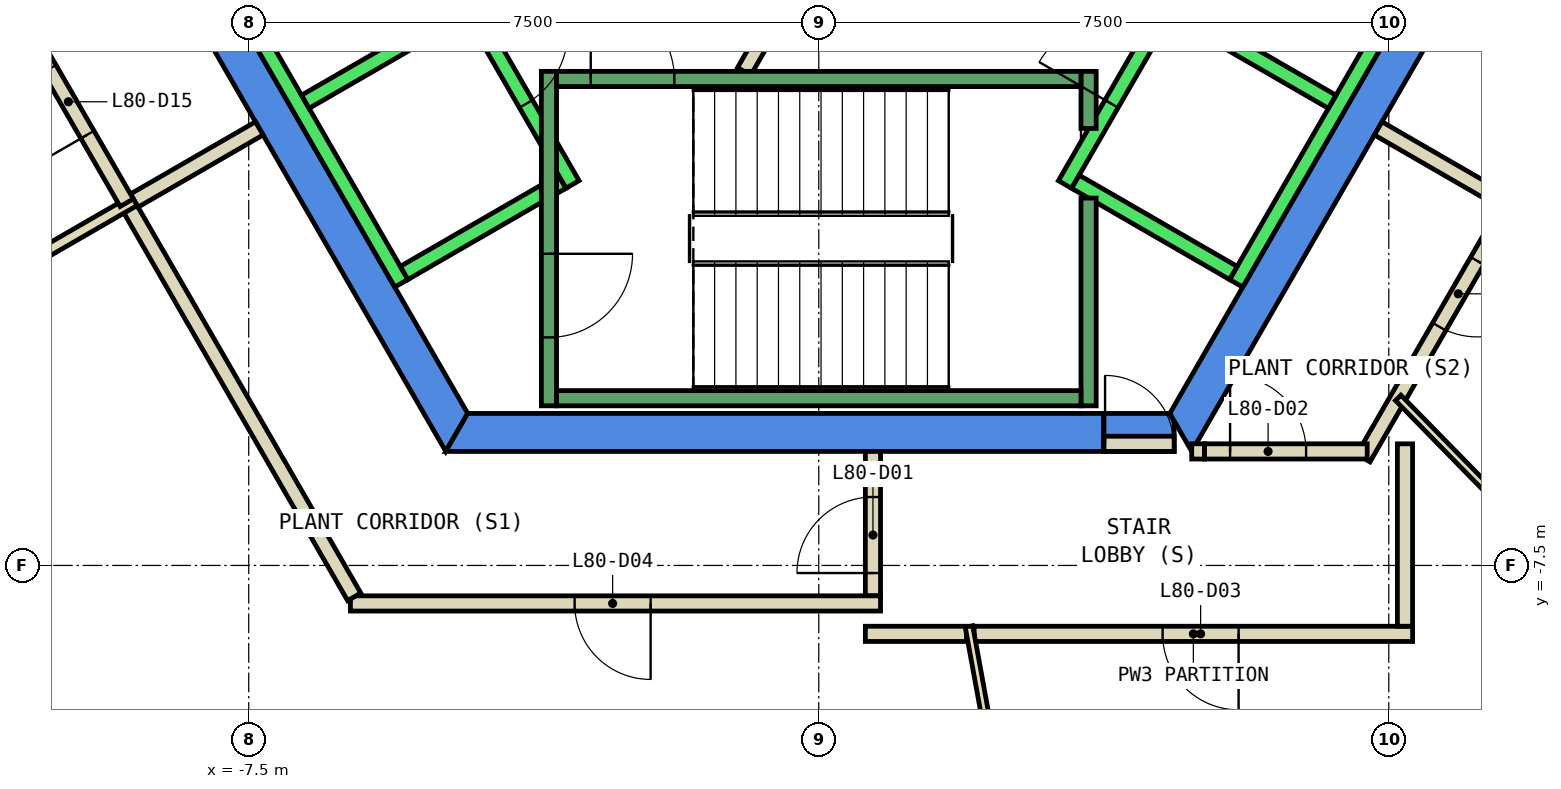
"""IFC4 building model, lengths in metres.
Left out: names, types, materials, properties, quantities, classifications, styles, units other than length and angle.
Written with IfcOpenShell. Run it as: python <this file> out.ifc"""

import sys

from ifc_helpers import new_model, si_unit, direction, frame, frame_2d, origin, place, context, subcontext, project, spatial, polyline, rectangle, outline, extrude, element, fill, save


model = new_model("IFC4")
c1 = context("Model", 3, precision=1e-05, world=origin(), true_north=direction((0.0, 1.0)))
c2 = subcontext(c1, "Body", "Model", "MODEL_VIEW")
j1 = project(units=[si_unit("LENGTHUNIT", "METRE"), si_unit("PLANEANGLEUNIT", "RADIAN")], contexts=[c1])
p1 = place(None, origin())
s1 = spatial("IfcSite", under=j1, at=p1, CompositionType="ELEMENT")
p2 = place(p1, origin())
s2 = spatial("IfcBuilding", under=s1, at=p2, CompositionType="ELEMENT")
p3 = place(p2, frame((0.0, 0.0, 340.4)))
s3 = spatial("IfcBuildingStorey", under=s2, at=p3, CompositionType="ELEMENT", Elevation=340.4)
p4 = place(p3, frame((0.0, 0.0, -0.45)))
e1 = element("IfcWall", 1, at=p4, inside=s3, PredefinedType="SHEAR", context=c2, shape_type="SweptSolid", body=[
    extrude(outline(polyline([(-9.815, 2.5), (-4.907, -6.0), (-4.619, -5.5), (-9.238, 2.5), (-9.815, 2.5)])), origin(), (0.0, 0.0, 1.0), 4.6),
])
p5 = place(p3, frame((0.0, 0.0, -0.45)))
e2 = element("IfcWall", 2, at=p5, inside=s3, PredefinedType="SHEAR", context=c2, shape_type="SweptSolid", body=[
    extrude(outline(polyline([(3.75, -6.0), (3.75, -5.5), (-4.619, -5.5), (-4.907, -6.0), (3.75, -6.0)])), origin(), (0.0, 0.0, 1.0), 4.6),
])
p6 = place(p3, frame((0.0, 0.0, 3.6)))
e3 = element("IfcWall", 3, at=p6, inside=s3, PredefinedType="SHEAR", context=c2, shape_type="SweptSolid", body=[
    extrude(outline(polyline([(4.676, -6.0), (4.676, -5.6), (4.619, -5.5), (3.75, -5.5), (3.75, -6.0), (4.676, -6.0)])), origin(), (0.0, 0.0, 1.0), 0.55),
])
p7 = place(p3, frame((0.0, 0.0, -0.45)))
e4 = element("IfcWall", 4, at=p7, inside=s3, PredefinedType="SHEAR", context=c2, shape_type="SweptSolid", body=[
    extrude(outline(polyline([(4.907, -6.0), (9.815, 2.5), (9.238, 2.5), (4.619, -5.5), (4.907, -6.0)])), origin(), (0.0, 0.0, 1.0), 4.6),
])
p8 = place(p3, frame((-0.982, -1.0, 0.0), z_axis=(0.0, 0.0, 1.0), x_axis=(0.50024047865, 0.865886518847, 0.0)))
e5 = element("IfcWall", 5, at=p8, inside=s3, PredefinedType="PARTITIONING", context=c2, shape_type="SweptSolid", body=[
    extrude(rectangle(XDim=1.863, YDim=0.2, at=frame_2d((0.931, 0.0))), origin(), (0.0, 0.0, 1.0), 4.15),
])
p9 = place(p3, frame((0.713, -7.9, 0.0), z_axis=(0.0, 0.0, 1.0), x_axis=(0.0, 1.0, 0.0)))
e6 = element("IfcWall", 6, at=p9, inside=s3, PredefinedType="PARTITIONING", context=c2, shape_type="SweptSolid", body=[
    extrude(rectangle(XDim=1.9, YDim=0.2, at=frame_2d((0.95, 0.0))), origin(), (0.0, 0.0, 1.0), 4.15),
])
p10 = place(p9, frame((0.3, 0.0, 0.0)))
e7 = element("IfcOpeningElement", 7, at=p10, cuts=e6, PredefinedType="OPENING", context=c2, shape_type="SweptSolid", body=[
    extrude(rectangle(XDim=1.0, YDim=2.1, at=frame_2d((0.5, 1.05))), frame((0.0, 0.11, 0.0), z_axis=(0.0, -1.0, 0.0), x_axis=(1.0, 0.0, 0.0)), (0.0, 0.0, 1.0), 0.22),
])
p11 = place(p3, frame((4.907, -6.0, 0.0), z_axis=(0.0, 0.0, 1.0), x_axis=(1.0, 0.0, 0.0)))
e8 = element("IfcWall", 8, at=p11, inside=s3, PredefinedType="PARTITIONING", context=c2, shape_type="SweptSolid", body=[
    extrude(rectangle(XDim=0.169, YDim=0.2, at=frame_2d((0.084, 0.0))), origin(), (0.0, 0.0, 1.0), 2.4),
])
p12 = place(p3, frame((7.813, -8.4, 0.0), z_axis=(0.0, 0.0, 1.0), x_axis=(-1.0, 0.0, 0.0)))
e9 = element("IfcWall", 9, at=p12, inside=s3, PredefinedType="PARTITIONING", context=c2, shape_type="SweptSolid", body=[
    extrude(rectangle(XDim=5.769, YDim=0.2, at=frame_2d((2.885, 0.0))), origin(), (0.0, 0.0, 1.0), 4.15),
])
p13 = place(p12, frame((2.289, 0.0, 0.0)))
e10 = element("IfcOpeningElement", 10, at=p13, cuts=e9, PredefinedType="OPENING", context=c2, shape_type="SweptSolid", body=[
    extrude(rectangle(XDim=1.0, YDim=2.1, at=frame_2d((0.5, 1.05))), frame((0.0, 0.11, 0.0), z_axis=(0.0, -1.0, 0.0), x_axis=(1.0, 0.0, 0.0)), (0.0, 0.0, 1.0), 0.22),
])
p14 = place(p3, frame((7.713, -5.9, 0.0), z_axis=(0.0, 0.0, 1.0), x_axis=(0.0, -1.0, 0.0)))
e11 = element("IfcWall", 11, at=p14, inside=s3, PredefinedType="PARTITIONING", context=c2, shape_type="SweptSolid", body=[
    extrude(rectangle(XDim=2.4, YDim=0.2, at=frame_2d((1.2, 0.0))), origin(), (0.0, 0.0, 1.0), 4.15),
])
p15 = place(p3, frame((1.944, -8.4, 0.0), z_axis=(0.0, 0.0, 1.0), x_axis=(-1.0, 0.0, 0.0)))
e12 = element("IfcWall", 12, at=p15, inside=s3, PredefinedType="PARTITIONING", context=c2, shape_type="SweptSolid", body=[
    extrude(rectangle(XDim=1.331, YDim=0.2, at=frame_2d((0.666, 0.0))), origin(), (0.0, 0.0, 1.0), 4.15),
])
p16 = place(p3, frame((0.813, -8.0, 0.0), z_axis=(0.0, 0.0, 1.0), x_axis=(-1.0, 0.0, 0.0)))
e13 = element("IfcWall", 13, at=p16, inside=s3, PredefinedType="PARTITIONING", context=c2, shape_type="SweptSolid", body=[
    extrude(rectangle(XDim=6.975, YDim=0.2, at=frame_2d((3.488, 0.0))), origin(), (0.0, 0.0, 1.0), 4.15),
])
p17 = place(p16, frame((3.025, 0.0, 0.0)))
e14 = element("IfcOpeningElement", 14, at=p17, cuts=e13, PredefinedType="OPENING", context=c2, shape_type="SweptSolid", body=[
    extrude(rectangle(XDim=1.0, YDim=2.1, at=frame_2d((0.5, 1.05))), frame((0.0, 0.11, 0.0), z_axis=(0.0, -1.0, 0.0), x_axis=(1.0, 0.0, 0.0)), (0.0, 0.0, 1.0), 0.22),
])
p18 = place(p3, frame((-6.112, -7.913, 0.0), z_axis=(0.0, 0.0, 1.0), x_axis=(-0.499915430684, 0.866074224396, 0.0)))
e15 = element("IfcWall", 15, at=p18, inside=s3, PredefinedType="PARTITIONING", context=c2, shape_type="SweptSolid", body=[
    extrude(rectangle(XDim=5.987, YDim=0.2, at=frame_2d((2.993, 0.0))), origin(), (0.0, 0.0, 1.0), 4.15),
])
p19 = place(p3, frame((-9.006, -2.7, 0.0), z_axis=(0.0, 0.0, 1.0), x_axis=(0.865980106173, 0.500078449558, 0.0)))
e16 = element("IfcWall", 16, at=p19, inside=s3, PredefinedType="PARTITIONING", context=c2, shape_type="SweptSolid", body=[
    extrude(rectangle(XDim=1.9, YDim=0.2, at=frame_2d((0.95, 0.0))), origin(), (0.0, 0.0, 1.0), 4.15),
])
p20 = place(p3, frame((9.106, -2.728, 0.0), z_axis=(0.0, 0.0, 1.0), x_axis=(-0.500132879116, -0.865948672398, 0.0)))
e17 = element("IfcWall", 17, at=p20, inside=s3, PredefinedType="PARTITIONING", context=c2, shape_type="SweptSolid", body=[
    extrude(rectangle(XDim=3.879, YDim=0.2, at=frame_2d((1.939, 0.0))), origin(), (0.0, 0.0, 1.0), 4.15),
])
p21 = place(p20, frame((0.884, 0.0, 0.0)))
e18 = element("IfcOpeningElement", 18, at=p21, cuts=e17, PredefinedType="OPENING", context=c2, shape_type="SweptSolid", body=[
    extrude(rectangle(XDim=1.0, YDim=2.1, at=frame_2d((0.5, 1.05))), frame((0.0, 0.11, 0.0), z_axis=(0.0, -1.0, 0.0), x_axis=(1.0, 0.0, 0.0)), (0.0, 0.0, 1.0), 0.22),
])
p22 = place(p3, frame((7.361, -1.75, 0.0), z_axis=(0.0, 0.0, 1.0), x_axis=(0.865980106173, -0.500078449558, 0.0)))
e19 = element("IfcWall", 19, at=p22, inside=s3, PredefinedType="PARTITIONING", context=c2, shape_type="SweptSolid", body=[
    extrude(rectangle(XDim=1.9, YDim=0.2, at=frame_2d((0.95, 0.0))), origin(), (0.0, 0.0, 1.0), 4.15),
])
p23 = place(p3, frame((3.139, -14.661, 0.0), z_axis=(0.0, 0.0, 1.0), x_axis=(-0.179885726398, 0.983687514121, 0.0)))
e20 = element("IfcWall", 20, at=p23, inside=s3, PredefinedType="PARTITIONING", context=c2, shape_type="SweptSolid", body=[
    extrude(rectangle(XDim=6.464, YDim=0.1, at=frame_2d((3.232, 0.0))), origin(), (0.0, 0.0, 1.0), 4.15),
])
p24 = place(p3, frame((7.624, -5.295, 0.0), z_axis=(0.0, 0.0, 1.0), x_axis=(0.699225895869, -0.714900794898, 0.0)))
e21 = element("IfcWall", 21, at=p24, inside=s3, PredefinedType="PARTITIONING", context=c2, shape_type="SweptSolid", body=[
    extrude(rectangle(XDim=11.681, YDim=0.1, at=frame_2d((5.841, 0.0))), origin(), (0.0, 0.0, 1.0), 4.15),
])
p25 = place(p3, frame((-19.664, -8.853, 0.0), z_axis=(0.0, 0.0, 1.0), x_axis=(0.866035935173, 0.499981758657, 0.0)))
e22 = element("IfcWall", 22, at=p25, inside=s3, PredefinedType="PARTITIONING", context=c2, shape_type="SweptSolid", body=[
    extrude(rectangle(XDim=12.307, YDim=0.15, at=frame_2d((6.153, 0.0))), origin(), (0.0, 0.0, 1.0), 4.15),
])
p26 = place(p3, frame((-9.105, -2.728, 0.0), z_axis=(0.0, 0.0, 1.0), x_axis=(-0.500253029287, 0.865879267963, 0.0)))
e23 = element("IfcWall", 23, at=p26, inside=s3, PredefinedType="PARTITIONING", context=c2, shape_type="SweptSolid", body=[
    extrude(rectangle(XDim=2.814, YDim=0.2, at=frame_2d((1.407, 0.0))), origin(), (0.0, 0.0, 1.0), 4.15),
])
p27 = place(p26, frame((1.034, 0.0, 0.0)))
e24 = element("IfcOpeningElement", 24, at=p27, cuts=e23, PredefinedType="OPENING", context=c2, shape_type="SweptSolid", body=[
    extrude(rectangle(XDim=1.0, YDim=2.1, at=frame_2d((0.5, 1.05))), frame((0.0, 0.11, 0.0), z_axis=(0.0, -1.0, 0.0), x_axis=(1.0, 0.0, 0.0)), (0.0, 0.0, 1.0), 0.22),
])
p28 = place(p3, frame((3.75, -5.9, 0.0), z_axis=(0.0, 0.0, 1.0), x_axis=(1.0, 0.0, 0.0)))
e25 = element("IfcWall", 25, at=p28, inside=s3, PredefinedType="PARTITIONING", context=c2, shape_type="SweptSolid", body=[
    extrude(rectangle(XDim=0.926, YDim=0.2, at=frame_2d((0.463, 0.0))), origin(), (0.0, 0.0, 1.0), 2.4),
])
p29 = place(p28, frame((0.017, 0.0, 0.0)))
e26 = element("IfcOpeningElement", 26, at=p29, cuts=e25, PredefinedType="OPENING", context=c2, shape_type="SweptSolid", body=[
    extrude(rectangle(XDim=0.9, YDim=2.1, at=frame_2d((0.45, 1.05))), frame((0.0, 0.11, 0.0), z_axis=(0.0, -1.0, 0.0), x_axis=(1.0, 0.0, 0.0)), (0.0, 0.0, 1.0), 0.22),
])
p30 = place(p3, frame((5.076, -6.0, 0.0), z_axis=(0.0, 0.0, 1.0), x_axis=(1.0, 0.0, 0.0)))
e27 = element("IfcWall", 27, at=p30, inside=s3, PredefinedType="PARTITIONING", context=c2, shape_type="SweptSolid", body=[
    extrude(rectangle(XDim=2.14, YDim=0.2, at=frame_2d((1.07, 0.0))), origin(), (0.0, 0.0, 1.0), 4.15),
])
p31 = place(p30, frame((0.336, 0.0, 0.0)))
e28 = element("IfcOpeningElement", 28, at=p31, cuts=e27, PredefinedType="OPENING", context=c2, shape_type="SweptSolid", body=[
    extrude(rectangle(XDim=1.0, YDim=2.1, at=frame_2d((0.5, 1.05))), frame((0.0, 0.11, 0.0), z_axis=(0.0, -1.0, 0.0), x_axis=(1.0, 0.0, 0.0)), (0.0, 0.0, 1.0), 0.22),
])
p32 = place(p3, frame((-5.94, 2.188, 0.0), z_axis=(0.0, 0.0, 1.0), x_axis=(0.500034260056, -0.866005622828, 0.0)))
e29 = element("IfcWall", 29, at=p32, inside=s3, PredefinedType="STANDARD", context=c2, shape_type="SweptSolid", body=[
    extrude(rectangle(XDim=5.399, YDim=0.2, at=frame_2d((2.7, 0.0))), origin(), (0.0, 0.0, 1.0), 4.15),
])
p33 = place(p32, frame((3.075, 0.0, 0.0)))
e30 = element("IfcOpeningElement", 30, at=p33, cuts=e29, PredefinedType="OPENING", context=c2, shape_type="SweptSolid", body=[
    extrude(rectangle(XDim=1.1, YDim=2.1, at=frame_2d((0.55, 1.05))), frame((0.0, 0.11, 0.0), z_axis=(0.0, -1.0, 0.0), x_axis=(1.0, 0.0, 0.0)), (0.0, 0.0, 1.0), 0.22),
])
p34 = place(p32, frame((1.225, 0.0, 0.0)))
e31 = element("IfcOpeningElement", 31, at=p34, cuts=e29, PredefinedType="OPENING", context=c2, shape_type="SweptSolid", body=[
    extrude(rectangle(XDim=1.1, YDim=2.1, at=frame_2d((0.55, 1.05))), frame((0.0, 0.11, 0.0), z_axis=(0.0, -1.0, 0.0), x_axis=(1.0, 0.0, 0.0)), (0.0, 0.0, 1.0), 0.22),
])
p35 = place(p3, frame((-8.192, 0.888, 0.0), z_axis=(0.0, 0.0, 1.0), x_axis=(0.500034260056, -0.866005622828, 0.0)))
e32 = element("IfcWall", 32, at=p35, inside=s3, PredefinedType="STANDARD", context=c2, shape_type="SweptSolid", body=[
    extrude(rectangle(XDim=5.399, YDim=0.2, at=frame_2d((2.7, 0.0))), origin(), (0.0, 0.0, 1.0), 4.15),
])
p36 = place(p3, frame((-4.677, -0.2, 0.0), z_axis=(0.0, 0.0, 1.0), x_axis=(-0.865973769406, -0.500089422704, 0.0)))
e33 = element("IfcWall", 33, at=p36, inside=s3, PredefinedType="STANDARD", context=c2, shape_type="SweptSolid", body=[
    extrude(rectangle(XDim=2.399, YDim=0.2, at=frame_2d((1.2, 0.0))), origin(), (0.0, 0.0, 1.0), 4.15),
])
p37 = place(p3, frame((-3.377, -2.452, 0.0), z_axis=(0.0, 0.0, 1.0), x_axis=(-0.865955154139, -0.50012165622, 0.0)))
e34 = element("IfcWall", 34, at=p37, inside=s3, PredefinedType="STANDARD", context=c2, shape_type="SweptSolid", body=[
    extrude(rectangle(XDim=2.4, YDim=0.2, at=frame_2d((1.2, 0.0))), origin(), (0.0, 0.0, 1.0), 4.15),
])
p38 = place(p3, frame((3.24, -2.488, 0.0), z_axis=(0.0, 0.0, 1.0), x_axis=(0.500034260056, 0.866005622828, 0.0)))
e35 = element("IfcWall", 35, at=p38, inside=s3, PredefinedType="STANDARD", context=c2, shape_type="SweptSolid", body=[
    extrude(rectangle(XDim=5.399, YDim=0.2, at=frame_2d((2.7, 0.0))), origin(), (0.0, 0.0, 1.0), 4.15),
])
p39 = place(p38, frame((3.225, 0.0, 0.0)))
e36 = element("IfcOpeningElement", 36, at=p39, cuts=e35, PredefinedType="OPENING", context=c2, shape_type="SweptSolid", body=[
    extrude(rectangle(XDim=1.1, YDim=2.1, at=frame_2d((0.55, 1.05))), frame((0.0, 0.11, 0.0), z_axis=(0.0, -1.0, 0.0), x_axis=(1.0, 0.0, 0.0)), (0.0, 0.0, 1.0), 0.22),
])
p40 = place(p38, frame((1.225, 0.0, 0.0)))
e37 = element("IfcOpeningElement", 37, at=p40, cuts=e35, PredefinedType="OPENING", context=c2, shape_type="SweptSolid", body=[
    extrude(rectangle(XDim=1.1, YDim=2.1, at=frame_2d((0.55, 1.05))), frame((0.0, 0.11, 0.0), z_axis=(0.0, -1.0, 0.0), x_axis=(1.0, 0.0, 0.0)), (0.0, 0.0, 1.0), 0.22),
])
p41 = place(p3, frame((5.492, -3.788, 0.0), z_axis=(0.0, 0.0, 1.0), x_axis=(0.500034260056, 0.866005622828, 0.0)))
e38 = element("IfcWall", 38, at=p41, inside=s3, PredefinedType="STANDARD", context=c2, shape_type="SweptSolid", body=[
    extrude(rectangle(XDim=5.399, YDim=0.2, at=frame_2d((2.7, 0.0))), origin(), (0.0, 0.0, 1.0), 4.15),
])
p42 = place(p3, frame((3.377, -2.452, 0.0), z_axis=(0.0, 0.0, 1.0), x_axis=(0.865955154139, -0.50012165622, 0.0)))
e39 = element("IfcWall", 39, at=p42, inside=s3, PredefinedType="STANDARD", context=c2, shape_type="SweptSolid", body=[
    extrude(rectangle(XDim=2.4, YDim=0.2, at=frame_2d((1.2, 0.0))), origin(), (0.0, 0.0, 1.0), 4.15),
])
p43 = place(p3, frame((4.677, -0.2, 0.0), z_axis=(0.0, 0.0, 1.0), x_axis=(0.865973769406, -0.500089422704, 0.0)))
e40 = element("IfcWall", 40, at=p43, inside=s3, PredefinedType="STANDARD", context=c2, shape_type="SweptSolid", body=[
    extrude(rectangle(XDim=2.399, YDim=0.2, at=frame_2d((1.2, 0.0))), origin(), (0.0, 0.0, 1.0), 4.15),
])
p44 = place(p3, frame((-3.55, -1.0, 0.0), z_axis=(0.0, 0.0, 1.0), x_axis=(0.0, -1.0, 0.0)))
e41 = element("IfcWall", 41, at=p44, inside=s3, PredefinedType="STANDARD", context=c2, shape_type="SweptSolid", body=[
    extrude(rectangle(XDim=4.4, YDim=0.2, at=frame_2d((2.2, 0.0))), origin(), (0.0, 0.0, 1.0), 4.15),
])
p45 = place(p44, frame((2.4, 0.0, 0.0)))
e42 = element("IfcOpeningElement", 42, at=p45, cuts=e41, PredefinedType="OPENING", context=c2, shape_type="SweptSolid", body=[
    extrude(rectangle(XDim=1.1, YDim=2.2, at=frame_2d((0.55, 1.1))), frame((0.0, 0.11, 0.0), z_axis=(0.0, -1.0, 0.0), x_axis=(1.0, 0.0, 0.0)), (0.0, 0.0, 1.0), 0.22),
])
p46 = place(p3, frame((3.55, -2.667, 0.0), z_axis=(0.0, 0.0, 1.0), x_axis=(0.0, -1.0, 0.0)))
e43 = element("IfcWall", 43, at=p46, inside=s3, PredefinedType="STANDARD", context=c2, shape_type="SweptSolid", body=[
    extrude(rectangle(XDim=2.733, YDim=0.2, at=frame_2d((1.366, 0.0))), origin(), (0.0, 0.0, 1.0), 4.15),
])
p47 = place(p3, frame((3.55, -1.0, 0.0), z_axis=(0.0, 0.0, 1.0), x_axis=(0.0, -1.0, 0.0)))
e44 = element("IfcWall", 44, at=p47, inside=s3, PredefinedType="STANDARD", context=c2, shape_type="SweptSolid", body=[
    extrude(rectangle(XDim=0.751, YDim=0.2, at=frame_2d((0.375, 0.0))), origin(), (0.0, 0.0, 1.0), 4.15),
])
p48 = place(p3, frame((-3.45, -1.1, 0.0), z_axis=(0.0, 0.0, 1.0), x_axis=(1.0, 0.0, 0.0)))
e45 = element("IfcWall", 45, at=p48, inside=s3, PredefinedType="STANDARD", context=c2, shape_type="SweptSolid", body=[
    extrude(rectangle(XDim=6.9, YDim=0.2, at=frame_2d((3.45, 0.0))), origin(), (0.0, 0.0, 1.0), 4.15),
])
p49 = place(p48, frame((0.45, 0.0, 0.0)))
e46 = element("IfcOpeningElement", 46, at=p49, cuts=e45, PredefinedType="OPENING", context=c2, shape_type="SweptSolid", body=[
    extrude(rectangle(XDim=1.1, YDim=2.2, at=frame_2d((0.55, 1.1))), frame((0.0, 0.11, 0.0), z_axis=(0.0, -1.0, 0.0), x_axis=(1.0, 0.0, 0.0)), (0.0, 0.0, 1.0), 0.22),
])
p50 = place(p3, frame((-3.45, -5.3, 0.0), z_axis=(0.0, 0.0, 1.0), x_axis=(1.0, 0.0, 0.0)))
e47 = element("IfcWall", 47, at=p50, inside=s3, PredefinedType="STANDARD", context=c2, shape_type="SweptSolid", body=[
    extrude(rectangle(XDim=6.9, YDim=0.2, at=frame_2d((3.45, 0.0))), origin(), (0.0, 0.0, 1.0), 4.15),
])
p51 = place(p10, origin())
e48 = element("IfcDoor", 48, at=p51, inside=s3, OperationType="SINGLE_SWING_LEFT", PredefinedType="DOOR", context=c2, shape_type="SweptSolid", body=[
    extrude(rectangle(XDim=1.0, YDim=2.1, at=frame_2d((0.5, 1.05))), frame((0.0, 0.025, 0.0), z_axis=(0.0, -1.0, 0.0), x_axis=(1.0, 0.0, 0.0)), (0.0, 0.0, 1.0), 0.05),
])
fill(e7, e48)
p52 = place(p31, origin())
e49 = element("IfcDoor", 49, at=p52, inside=s3, OperationType="SINGLE_SWING_RIGHT", PredefinedType="DOOR", context=c2, shape_type="SweptSolid", body=[
    extrude(rectangle(XDim=1.0, YDim=2.1, at=frame_2d((0.5, 1.05))), frame((0.0, 0.025, 0.0), z_axis=(0.0, -1.0, 0.0), x_axis=(1.0, 0.0, 0.0)), (0.0, 0.0, 1.0), 0.05),
])
fill(e28, e49)
p53 = place(p13, origin())
e50 = element("IfcDoor", 50, at=p53, inside=s3, OperationType="SINGLE_SWING_LEFT", PredefinedType="DOOR", context=c2, shape_type="SweptSolid", body=[
    extrude(rectangle(XDim=1.0, YDim=2.1, at=frame_2d((0.5, 1.05))), frame((0.0, 0.025, 0.0), z_axis=(0.0, -1.0, 0.0), x_axis=(1.0, 0.0, 0.0)), (0.0, 0.0, 1.0), 0.05),
])
fill(e10, e50)
p54 = place(p17, origin())
e51 = element("IfcDoor", 51, at=p54, inside=s3, OperationType="SINGLE_SWING_RIGHT", PredefinedType="DOOR", context=c2, shape_type="SweptSolid", body=[
    extrude(rectangle(XDim=1.0, YDim=2.1, at=frame_2d((0.5, 1.05))), frame((0.0, 0.025, 0.0), z_axis=(0.0, -1.0, 0.0), x_axis=(1.0, 0.0, 0.0)), (0.0, 0.0, 1.0), 0.05),
])
fill(e14, e51)
p55 = place(p21, origin())
e52 = element("IfcDoor", 52, at=p55, inside=s3, OperationType="SINGLE_SWING_LEFT", PredefinedType="DOOR", context=c2, shape_type="SweptSolid", body=[
    extrude(rectangle(XDim=1.0, YDim=2.1, at=frame_2d((0.5, 1.05))), frame((0.0, 0.025, 0.0), z_axis=(0.0, -1.0, 0.0), x_axis=(1.0, 0.0, 0.0)), (0.0, 0.0, 1.0), 0.05),
])
fill(e18, e52)
p56 = place(p27, origin())
e53 = element("IfcDoor", 53, at=p56, inside=s3, OperationType="SINGLE_SWING_LEFT", PredefinedType="DOOR", context=c2, shape_type="SweptSolid", body=[
    extrude(rectangle(XDim=1.0, YDim=2.1, at=frame_2d((0.5, 1.05))), frame((0.0, 0.025, 0.0), z_axis=(0.0, -1.0, 0.0), x_axis=(1.0, 0.0, 0.0)), (0.0, 0.0, 1.0), 0.05),
])
fill(e24, e53)
p57 = place(p29, origin())
e54 = element("IfcDoor", 54, at=p57, inside=s3, OperationType="SINGLE_SWING_LEFT", PredefinedType="DOOR", context=c2, shape_type="SweptSolid", body=[
    extrude(rectangle(XDim=0.9, YDim=2.1, at=frame_2d((0.45, 1.05))), frame((0.0, 0.025, 0.0), z_axis=(0.0, -1.0, 0.0), x_axis=(1.0, 0.0, 0.0)), (0.0, 0.0, 1.0), 0.05),
])
fill(e26, e54)
p58 = place(p33, origin())
e55 = element("IfcDoor", 55, at=p58, inside=s3, OperationType="SLIDING_TO_LEFT", PredefinedType="DOOR", context=c2, shape_type="SweptSolid", body=[
    extrude(rectangle(XDim=1.1, YDim=2.1, at=frame_2d((0.55, 1.05))), frame((0.0, 0.025, 0.0), z_axis=(0.0, -1.0, 0.0), x_axis=(1.0, 0.0, 0.0)), (0.0, 0.0, 1.0), 0.05),
])
fill(e30, e55)
p59 = place(p40, origin())
e56 = element("IfcDoor", 56, at=p59, inside=s3, OperationType="SLIDING_TO_LEFT", PredefinedType="DOOR", context=c2, shape_type="SweptSolid", body=[
    extrude(rectangle(XDim=1.1, YDim=2.1, at=frame_2d((0.55, 1.05))), frame((0.0, 0.025, 0.0), z_axis=(0.0, -1.0, 0.0), x_axis=(1.0, 0.0, 0.0)), (0.0, 0.0, 1.0), 0.05),
])
fill(e37, e56)
p60 = place(p49, origin())
e57 = element("IfcDoor", 57, at=p60, inside=s3, OperationType="SINGLE_SWING_LEFT", PredefinedType="DOOR", context=c2, shape_type="SweptSolid", body=[
    extrude(rectangle(XDim=1.1, YDim=2.2, at=frame_2d((0.55, 1.1))), frame((0.0, 0.025, 0.0), z_axis=(0.0, -1.0, 0.0), x_axis=(1.0, 0.0, 0.0)), (0.0, 0.0, 1.0), 0.05),
])
fill(e46, e57)
p61 = place(p45, origin())
e58 = element("IfcDoor", 58, at=p61, inside=s3, OperationType="SINGLE_SWING_LEFT", PredefinedType="DOOR", context=c2, shape_type="SweptSolid", body=[
    extrude(rectangle(XDim=1.1, YDim=2.2, at=frame_2d((0.55, 1.1))), frame((0.0, 0.025, 0.0), z_axis=(0.0, -1.0, 0.0), x_axis=(1.0, 0.0, 0.0)), (0.0, 0.0, 1.0), 0.05),
])
fill(e42, e58)
save(model, sys.argv[1])
